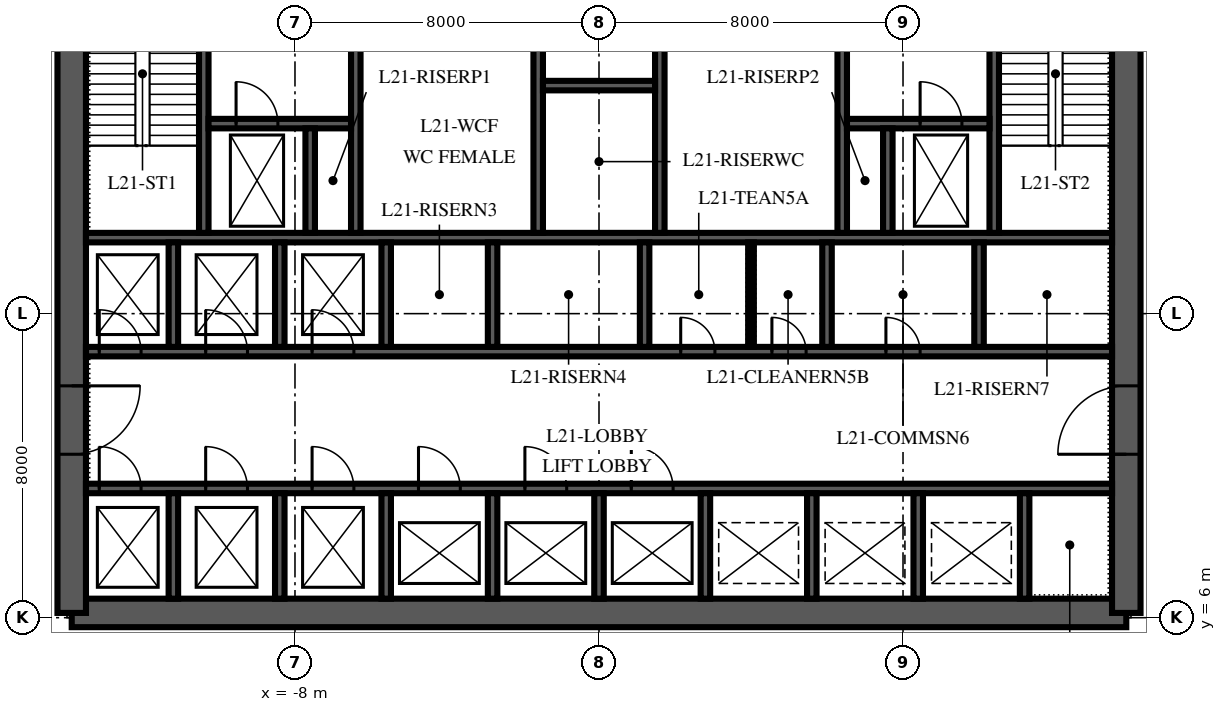
"""IFC4 building model, lengths in metres.
Left out: names, types, materials, properties, quantities, classifications, styles, units other than length and angle.
Written with IfcOpenShell. Run it as: python <this file> out.ifc"""

import sys

from ifc_helpers import new_model, si_unit, direction, frame, frame_2d, origin, place, context, subcontext, project, spatial, polyline, rectangle, outline, extrude, element, fill, save


model = new_model("IFC4")
c1 = context("Model", 3, precision=1e-05, world=origin(), true_north=direction((0.0, 1.0)))
c2 = subcontext(c1, "Body", "Model", "MODEL_VIEW")
j1 = project(units=[si_unit("LENGTHUNIT", "METRE"), si_unit("PLANEANGLEUNIT", "RADIAN")], contexts=[c1])
p1 = place(None, origin())
s1 = spatial("IfcSite", under=j1, at=p1, CompositionType="ELEMENT")
p2 = place(p1, origin())
s2 = spatial("IfcBuilding", under=s1, at=p2, CompositionType="ELEMENT")
p3 = place(p2, frame((0.0, 0.0, 98.0)))
s3 = spatial("IfcBuildingStorey", under=s2, at=p3, CompositionType="ELEMENT", Elevation=98.0)
p4 = place(p3, frame((-13.875, 6.125, 0.0), z_axis=(0.0, 0.0, 1.0), x_axis=(1.0, 0.0, 0.0)))
e1 = element("IfcWall", 1, at=p4, inside=s3, PredefinedType="SHEAR", context=c2, shape_type="SweptSolid", body=[
    extrude(rectangle(XDim=27.75, YDim=0.75, at=frame_2d((13.875, 0.0))), origin(), (0.0, 0.0, 1.0), 5.0),
])
p5 = place(p3, frame((13.875, 6.125, 0.0), z_axis=(0.0, 0.0, 1.0), x_axis=(0.0, 1.0, 0.0)))
e2 = element("IfcWall", 2, at=p5, inside=s3, PredefinedType="SHEAR", context=c2, shape_type="SweptSolid", body=[
    extrude(outline(polyline([(0.0, -0.375), (17.75, -0.375), (17.75, 0.0), (17.375, 0.0), (17.375, 0.375), (0.375, 0.375), (0.375, 0.0), (0.0, 0.0), (0.0, -0.375)])), origin(), (0.0, 0.0, 1.0), 5.0),
])
p6 = place(p5, frame((4.175, 0.0, 0.0)))
e3 = element("IfcOpeningElement", 3, at=p6, cuts=e2, PredefinedType="OPENING", context=c2, shape_type="SweptSolid", body=[
    extrude(rectangle(XDim=1.8, YDim=2.4, at=frame_2d((0.9, 1.2))), frame((0.0, 0.39, 0.0), z_axis=(0.0, -1.0, 0.0), x_axis=(1.0, 0.0, 0.0)), (0.0, 0.0, 1.0), 0.78),
])
p7 = place(p3, frame((-13.875, 23.875, 0.0), z_axis=(0.0, 0.0, 1.0), x_axis=(0.0, -1.0, 0.0)))
e4 = element("IfcWall", 4, at=p7, inside=s3, PredefinedType="SHEAR", context=c2, shape_type="SweptSolid", body=[
    extrude(outline(polyline([(0.0, -0.375), (17.75, -0.375), (17.75, 0.0), (17.375, 0.0), (17.375, 0.375), (0.375, 0.375), (0.375, 0.0), (0.0, 0.0), (0.0, -0.375)])), origin(), (0.0, 0.0, 1.0), 5.0),
])
p8 = place(p7, frame((11.775, 0.0, 0.0)))
e5 = element("IfcOpeningElement", 5, at=p8, cuts=e4, PredefinedType="OPENING", context=c2, shape_type="SweptSolid", body=[
    extrude(rectangle(XDim=1.8, YDim=2.4, at=frame_2d((0.9, 1.2))), frame((0.0, 0.39, 0.0), z_axis=(0.0, -1.0, 0.0), x_axis=(1.0, 0.0, 0.0)), (0.0, 0.0, 1.0), 0.78),
])
p9 = place(p3, frame((-13.5, 9.4, 0.0), z_axis=(0.0, 0.0, 1.0), x_axis=(1.0, 0.0, 0.0)))
e6 = element("IfcWall", 6, at=p9, inside=s3, PredefinedType="SHEAR", context=c2, shape_type="SweptSolid", body=[
    extrude(rectangle(XDim=27.0, YDim=0.25, at=frame_2d((13.5, 0.0))), origin(), (0.0, 0.0, 1.0), 5.0),
])
p10 = place(p9, frame((0.35, 0.0, 0.0)))
e7 = element("IfcOpeningElement", 7, at=p10, cuts=e6, PredefinedType="OPENING", context=c2, shape_type="SweptSolid", body=[
    extrude(rectangle(XDim=1.1, YDim=2.1, at=frame_2d((0.55, 1.05))), frame((0.0, 0.14, 0.0), z_axis=(0.0, -1.0, 0.0), x_axis=(1.0, 0.0, 0.0)), (0.0, 0.0, 1.0), 0.28),
])
p11 = place(p9, frame((3.15, 0.0, 0.0)))
e8 = element("IfcOpeningElement", 8, at=p11, cuts=e6, PredefinedType="OPENING", context=c2, shape_type="SweptSolid", body=[
    extrude(rectangle(XDim=1.1, YDim=2.1, at=frame_2d((0.55, 1.05))), frame((0.0, 0.14, 0.0), z_axis=(0.0, -1.0, 0.0), x_axis=(1.0, 0.0, 0.0)), (0.0, 0.0, 1.0), 0.28),
])
p12 = place(p9, frame((5.95, 0.0, 0.0)))
e9 = element("IfcOpeningElement", 9, at=p12, cuts=e6, PredefinedType="OPENING", context=c2, shape_type="SweptSolid", body=[
    extrude(rectangle(XDim=1.1, YDim=2.1, at=frame_2d((0.55, 1.05))), frame((0.0, 0.14, 0.0), z_axis=(0.0, -1.0, 0.0), x_axis=(1.0, 0.0, 0.0)), (0.0, 0.0, 1.0), 0.28),
])
p13 = place(p9, frame((8.75, 0.0, 0.0)))
e10 = element("IfcOpeningElement", 10, at=p13, cuts=e6, PredefinedType="OPENING", context=c2, shape_type="SweptSolid", body=[
    extrude(rectangle(XDim=1.1, YDim=2.1, at=frame_2d((0.55, 1.05))), frame((0.0, 0.14, 0.0), z_axis=(0.0, -1.0, 0.0), x_axis=(1.0, 0.0, 0.0)), (0.0, 0.0, 1.0), 0.28),
])
p14 = place(p9, frame((11.55, 0.0, 0.0)))
e11 = element("IfcOpeningElement", 11, at=p14, cuts=e6, PredefinedType="OPENING", context=c2, shape_type="SweptSolid", body=[
    extrude(rectangle(XDim=1.1, YDim=2.1, at=frame_2d((0.55, 1.05))), frame((0.0, 0.14, 0.0), z_axis=(0.0, -1.0, 0.0), x_axis=(1.0, 0.0, 0.0)), (0.0, 0.0, 1.0), 0.28),
])
p15 = place(p9, frame((14.35, 0.0, 0.0)))
e12 = element("IfcOpeningElement", 12, at=p15, cuts=e6, PredefinedType="OPENING", context=c2, shape_type="SweptSolid", body=[
    extrude(rectangle(XDim=1.1, YDim=2.1, at=frame_2d((0.55, 1.05))), frame((0.0, 0.14, 0.0), z_axis=(0.0, -1.0, 0.0), x_axis=(1.0, 0.0, 0.0)), (0.0, 0.0, 1.0), 0.28),
])
p16 = place(p3, frame((-13.5, 13.0, 0.0), z_axis=(0.0, 0.0, 1.0), x_axis=(1.0, 0.0, 0.0)))
e13 = element("IfcWall", 13, at=p16, inside=s3, PredefinedType="SHEAR", context=c2, shape_type="SweptSolid", body=[
    extrude(rectangle(XDim=27.0, YDim=0.25, at=frame_2d((13.5, 0.0))), origin(), (0.0, 0.0, 1.0), 5.0),
])
p17 = place(p16, frame((0.35, 0.0, 0.0)))
e14 = element("IfcOpeningElement", 14, at=p17, cuts=e13, PredefinedType="OPENING", context=c2, shape_type="SweptSolid", body=[
    extrude(rectangle(XDim=1.1, YDim=2.1, at=frame_2d((0.55, 1.05))), frame((0.0, 0.14, 0.0), z_axis=(0.0, -1.0, 0.0), x_axis=(1.0, 0.0, 0.0)), (0.0, 0.0, 1.0), 0.28),
])
p18 = place(p16, frame((3.15, 0.0, 0.0)))
e15 = element("IfcOpeningElement", 15, at=p18, cuts=e13, PredefinedType="OPENING", context=c2, shape_type="SweptSolid", body=[
    extrude(rectangle(XDim=1.1, YDim=2.1, at=frame_2d((0.55, 1.05))), frame((0.0, 0.14, 0.0), z_axis=(0.0, -1.0, 0.0), x_axis=(1.0, 0.0, 0.0)), (0.0, 0.0, 1.0), 0.28),
])
p19 = place(p16, frame((5.95, 0.0, 0.0)))
e16 = element("IfcOpeningElement", 16, at=p19, cuts=e13, PredefinedType="OPENING", context=c2, shape_type="SweptSolid", body=[
    extrude(rectangle(XDim=1.1, YDim=2.1, at=frame_2d((0.55, 1.05))), frame((0.0, 0.14, 0.0), z_axis=(0.0, -1.0, 0.0), x_axis=(1.0, 0.0, 0.0)), (0.0, 0.0, 1.0), 0.28),
])
p20 = place(p16, frame((15.65, 0.0, 0.0)))
e17 = element("IfcOpeningElement", 17, at=p20, cuts=e13, PredefinedType="OPENING", context=c2, shape_type="SweptSolid", body=[
    extrude(rectangle(XDim=0.9, YDim=2.1, at=frame_2d((0.45, 1.05))), frame((0.0, 0.14, 0.0), z_axis=(0.0, -1.0, 0.0), x_axis=(1.0, 0.0, 0.0)), (0.0, 0.0, 1.0), 0.28),
])
p21 = place(p16, frame((18.05, 0.0, 0.0)))
e18 = element("IfcOpeningElement", 18, at=p21, cuts=e13, PredefinedType="OPENING", context=c2, shape_type="SweptSolid", body=[
    extrude(rectangle(XDim=0.9, YDim=2.1, at=frame_2d((0.45, 1.05))), frame((0.0, 0.14, 0.0), z_axis=(0.0, -1.0, 0.0), x_axis=(1.0, 0.0, 0.0)), (0.0, 0.0, 1.0), 0.28),
])
p22 = place(p16, frame((21.05, 0.0, 0.0)))
e19 = element("IfcOpeningElement", 19, at=p22, cuts=e13, PredefinedType="OPENING", context=c2, shape_type="SweptSolid", body=[
    extrude(rectangle(XDim=0.9, YDim=2.1, at=frame_2d((0.45, 1.05))), frame((0.0, 0.14, 0.0), z_axis=(0.0, -1.0, 0.0), x_axis=(1.0, 0.0, 0.0)), (0.0, 0.0, 1.0), 0.28),
])
p23 = place(p3, frame((-13.5, 16.0, 0.0), z_axis=(0.0, 0.0, 1.0), x_axis=(1.0, 0.0, 0.0)))
e20 = element("IfcWall", 20, at=p23, inside=s3, PredefinedType="SHEAR", context=c2, shape_type="SweptSolid", body=[
    extrude(rectangle(XDim=27.0, YDim=0.25, at=frame_2d((13.5, 0.0))), origin(), (0.0, 0.0, 1.0), 5.0),
])
for number, where, z_axis, x_axis in (
    (21, (-11.2, 6.5, 0.0), (0.0, 0.0, 1.0), (0.0, 1.0, 0.0)),
    (22, (-8.4, 6.5, 0.0), (0.0, 0.0, 1.0), (0.0, 1.0, 0.0)),
    (23, (-5.6, 6.5, 0.0), (0.0, 0.0, 1.0), (0.0, 1.0, 0.0)),
    (24, (-2.8, 6.5, 0.0), (0.0, 0.0, 1.0), (0.0, 1.0, 0.0)),
    (25, (0.0, 6.5, 0.0), (0.0, 0.0, 1.0), (0.0, 1.0, 0.0)),
    (26, (2.8, 6.5, 0.0), (0.0, 0.0, 1.0), (0.0, 1.0, 0.0)),
    (27, (5.6, 6.5, 0.0), (0.0, 0.0, 1.0), (0.0, 1.0, 0.0)),
    (28, (8.4, 6.5, 0.0), (0.0, 0.0, 1.0), (0.0, 1.0, 0.0)),
    (29, (11.2, 6.5, 0.0), (0.0, 0.0, 1.0), (0.0, 1.0, 0.0)),
):
    element("IfcWall", number, at=place(p3, frame(where, z_axis=z_axis, x_axis=x_axis)), inside=s3, PredefinedType="SHEAR", context=c2, shape_type="SweptSolid", body=[
        extrude(rectangle(XDim=2.775, YDim=0.25, at=frame_2d((1.387, 0.0))), origin(), (0.0, 0.0, 1.0), 5.0),
    ])
for number, where, z_axis, x_axis in (
    (30, (-11.2, 13.125, 0.0), (0.0, 0.0, 1.0), (0.0, 1.0, 0.0)),
    (31, (-8.4, 13.125, 0.0), (0.0, 0.0, 1.0), (0.0, 1.0, 0.0)),
    (32, (-5.6, 13.125, 0.0), (0.0, 0.0, 1.0), (0.0, 1.0, 0.0)),
    (33, (-2.8, 13.125, 0.0), (0.0, 0.0, 1.0), (0.0, 1.0, 0.0)),
    (34, (1.2, 13.125, 0.0), (0.0, 0.0, 1.0), (0.0, 1.0, 0.0)),
    (35, (6.0, 13.125, 0.0), (0.0, 0.0, 1.0), (0.0, 1.0, 0.0)),
    (36, (10.0, 13.125, 0.0), (0.0, 0.0, 1.0), (0.0, 1.0, 0.0)),
):
    element("IfcWall", number, at=place(p3, frame(where, z_axis=z_axis, x_axis=x_axis)), inside=s3, PredefinedType="SHEAR", context=c2, shape_type="SweptSolid", body=[
        extrude(rectangle(XDim=2.75, YDim=0.25, at=frame_2d((1.375, 0.0))), origin(), (0.0, 0.0, 1.0), 5.0),
    ])
p24 = place(p3, frame((-10.4, 16.125, 0.0), z_axis=(0.0, 0.0, 1.0), x_axis=(0.0, 1.0, 0.0)))
e37 = element("IfcWall", 37, at=p24, inside=s3, PredefinedType="SHEAR", context=c2, shape_type="SweptSolid", body=[
    extrude(rectangle(XDim=7.375, YDim=0.25, at=frame_2d((3.688, 0.0))), origin(), (0.0, 0.0, 1.0), 5.0),
])
p25 = place(p24, frame((6.175, 0.0, 0.0)))
e38 = element("IfcOpeningElement", 38, at=p25, cuts=e37, PredefinedType="OPENING", context=c2, shape_type="SweptSolid", body=[
    extrude(rectangle(XDim=1.0, YDim=2.1, at=frame_2d((0.5, 1.05))), frame((0.0, 0.14, 0.0), z_axis=(0.0, -1.0, 0.0), x_axis=(1.0, 0.0, 0.0)), (0.0, 0.0, 1.0), 0.28),
])
for number, where, z_axis, x_axis in (
    (39, (-6.4, 16.125, 0.0), (0.0, 0.0, 1.0), (0.0, 1.0, 0.0)),
    (40, (-1.6, 16.125, 0.0), (0.0, 0.0, 1.0), (0.0, 1.0, 0.0)),
    (41, (1.6, 16.125, 0.0), (0.0, 0.0, 1.0), (0.0, 1.0, 0.0)),
    (42, (6.4, 16.125, 0.0), (0.0, 0.0, 1.0), (0.0, 1.0, 0.0)),
):
    element("IfcWall", number, at=place(p3, frame(where, z_axis=z_axis, x_axis=x_axis)), inside=s3, PredefinedType="SHEAR", context=c2, shape_type="SweptSolid", body=[
        extrude(rectangle(XDim=7.375, YDim=0.25, at=frame_2d((3.688, 0.0))), origin(), (0.0, 0.0, 1.0), 5.0),
    ])
p26 = place(p3, frame((10.4, 16.125, 0.0), z_axis=(0.0, 0.0, 1.0), x_axis=(0.0, 1.0, 0.0)))
e43 = element("IfcWall", 43, at=p26, inside=s3, PredefinedType="SHEAR", context=c2, shape_type="SweptSolid", body=[
    extrude(rectangle(XDim=7.375, YDim=0.25, at=frame_2d((3.688, 0.0))), origin(), (0.0, 0.0, 1.0), 5.0),
])
p27 = place(p26, frame((6.175, 0.0, 0.0)))
e44 = element("IfcOpeningElement", 44, at=p27, cuts=e43, PredefinedType="OPENING", context=c2, shape_type="SweptSolid", body=[
    extrude(rectangle(XDim=1.0, YDim=2.1, at=frame_2d((0.5, 1.05))), frame((0.0, 0.14, 0.0), z_axis=(0.0, -1.0, 0.0), x_axis=(1.0, 0.0, 0.0)), (0.0, 0.0, 1.0), 0.28),
])
p28 = place(p3, frame((-10.275, 19.0, 0.0), z_axis=(0.0, 0.0, 1.0), x_axis=(1.0, 0.0, 0.0)))
e45 = element("IfcWall", 45, at=p28, inside=s3, PredefinedType="SHEAR", context=c2, shape_type="SweptSolid", body=[
    extrude(rectangle(XDim=3.75, YDim=0.25, at=frame_2d((1.875, 0.0))), origin(), (0.0, 0.0, 1.0), 5.0),
])
p29 = place(p28, frame((0.725, 0.0, 0.0)))
e46 = element("IfcOpeningElement", 46, at=p29, cuts=e45, PredefinedType="OPENING", context=c2, shape_type="SweptSolid", body=[
    extrude(rectangle(XDim=1.1, YDim=2.1, at=frame_2d((0.55, 1.05))), frame((0.0, 0.14, 0.0), z_axis=(0.0, -1.0, 0.0), x_axis=(1.0, 0.0, 0.0)), (0.0, 0.0, 1.0), 0.28),
])
p30 = place(p3, frame((6.525, 19.0, 0.0), z_axis=(0.0, 0.0, 1.0), x_axis=(1.0, 0.0, 0.0)))
e47 = element("IfcWall", 47, at=p30, inside=s3, PredefinedType="SHEAR", context=c2, shape_type="SweptSolid", body=[
    extrude(rectangle(XDim=3.75, YDim=0.25, at=frame_2d((1.875, 0.0))), origin(), (0.0, 0.0, 1.0), 5.0),
])
p31 = place(p30, frame((1.925, 0.0, 0.0)))
e48 = element("IfcOpeningElement", 48, at=p31, cuts=e47, PredefinedType="OPENING", context=c2, shape_type="SweptSolid", body=[
    extrude(rectangle(XDim=1.1, YDim=2.1, at=frame_2d((0.55, 1.05))), frame((0.0, 0.14, 0.0), z_axis=(0.0, -1.0, 0.0), x_axis=(1.0, 0.0, 0.0)), (0.0, 0.0, 1.0), 0.28),
])
for number, where, z_axis, x_axis in (
    (49, (-7.6, 16.125, 0.0), (0.0, 0.0, 1.0), (0.0, 1.0, 0.0)),
    (50, (7.6, 16.125, 0.0), (0.0, 0.0, 1.0), (0.0, 1.0, 0.0)),
):
    element("IfcWall", number, at=place(p3, frame(where, z_axis=z_axis, x_axis=x_axis)), inside=s3, PredefinedType="SHEAR", context=c2, shape_type="SweptSolid", body=[
        extrude(rectangle(XDim=2.75, YDim=0.25, at=frame_2d((1.375, 0.0))), origin(), (0.0, 0.0, 1.0), 5.0),
    ])
p32 = place(p3, frame((-1.475, 20.0, 0.0), z_axis=(0.0, 0.0, 1.0), x_axis=(1.0, 0.0, 0.0)))
e51 = element("IfcWall", 51, at=p32, inside=s3, PredefinedType="SHEAR", context=c2, shape_type="SweptSolid", body=[
    extrude(rectangle(XDim=2.95, YDim=0.25, at=frame_2d((1.475, 0.0))), origin(), (0.0, 0.0, 1.0), 5.0),
])
p33 = place(p3, frame((4.0, 13.125, 0.0), z_axis=(0.0, 0.0, 1.0), x_axis=(0.0, 1.0, 0.0)))
e52 = element("IfcWall", 52, at=p33, inside=s3, PredefinedType="PARTITIONING", context=c2, shape_type="SweptSolid", body=[
    extrude(rectangle(XDim=2.75, YDim=0.15, at=frame_2d((1.375, 0.0))), origin(), (0.0, 0.0, 1.0), 4.85),
])
p34 = place(p6, origin())
e53 = element("IfcDoor", 53, at=p34, inside=s3, OperationType="DOUBLE_DOOR_SINGLE_SWING", PredefinedType="DOOR", context=c2, shape_type="SweptSolid", body=[
    extrude(rectangle(XDim=1.8, YDim=2.4, at=frame_2d((0.9, 1.2))), frame((0.0, 0.375, 0.0), z_axis=(0.0, -1.0, 0.0), x_axis=(1.0, 0.0, 0.0)), (0.0, 0.0, 1.0), 0.75),
])
fill(e3, e53)
p35 = place(p8, origin())
e54 = element("IfcDoor", 54, at=p35, inside=s3, OperationType="DOUBLE_DOOR_SINGLE_SWING", PredefinedType="DOOR", context=c2, shape_type="SweptSolid", body=[
    extrude(rectangle(XDim=1.8, YDim=2.4, at=frame_2d((0.9, 1.2))), frame((0.0, 0.375, 0.0), z_axis=(0.0, -1.0, 0.0), x_axis=(1.0, 0.0, 0.0)), (0.0, 0.0, 1.0), 0.75),
])
fill(e5, e54)
p36 = place(p10, origin())
e55 = element("IfcDoor", 55, at=p36, inside=s3, OperationType="SLIDING_TO_LEFT", PredefinedType="DOOR", context=c2, shape_type="SweptSolid", body=[
    extrude(rectangle(XDim=1.1, YDim=2.1, at=frame_2d((0.55, 1.05))), frame((0.0, 0.125, 0.0), z_axis=(0.0, -1.0, 0.0), x_axis=(1.0, 0.0, 0.0)), (0.0, 0.0, 1.0), 0.25),
])
fill(e7, e55)
p37 = place(p11, origin())
e56 = element("IfcDoor", 56, at=p37, inside=s3, OperationType="SLIDING_TO_LEFT", PredefinedType="DOOR", context=c2, shape_type="SweptSolid", body=[
    extrude(rectangle(XDim=1.1, YDim=2.1, at=frame_2d((0.55, 1.05))), frame((0.0, 0.125, 0.0), z_axis=(0.0, -1.0, 0.0), x_axis=(1.0, 0.0, 0.0)), (0.0, 0.0, 1.0), 0.25),
])
fill(e8, e56)
p38 = place(p12, origin())
e57 = element("IfcDoor", 57, at=p38, inside=s3, OperationType="SLIDING_TO_LEFT", PredefinedType="DOOR", context=c2, shape_type="SweptSolid", body=[
    extrude(rectangle(XDim=1.1, YDim=2.1, at=frame_2d((0.55, 1.05))), frame((0.0, 0.125, 0.0), z_axis=(0.0, -1.0, 0.0), x_axis=(1.0, 0.0, 0.0)), (0.0, 0.0, 1.0), 0.25),
])
fill(e9, e57)
p39 = place(p17, origin())
e58 = element("IfcDoor", 58, at=p39, inside=s3, OperationType="SLIDING_TO_LEFT", PredefinedType="DOOR", context=c2, shape_type="SweptSolid", body=[
    extrude(rectangle(XDim=1.1, YDim=2.1, at=frame_2d((0.55, 1.05))), frame((0.0, 0.125, 0.0), z_axis=(0.0, -1.0, 0.0), x_axis=(1.0, 0.0, 0.0)), (0.0, 0.0, 1.0), 0.25),
])
fill(e14, e58)
p40 = place(p18, origin())
e59 = element("IfcDoor", 59, at=p40, inside=s3, OperationType="SLIDING_TO_LEFT", PredefinedType="DOOR", context=c2, shape_type="SweptSolid", body=[
    extrude(rectangle(XDim=1.1, YDim=2.1, at=frame_2d((0.55, 1.05))), frame((0.0, 0.125, 0.0), z_axis=(0.0, -1.0, 0.0), x_axis=(1.0, 0.0, 0.0)), (0.0, 0.0, 1.0), 0.25),
])
fill(e15, e59)
p41 = place(p19, origin())
e60 = element("IfcDoor", 60, at=p41, inside=s3, OperationType="SLIDING_TO_LEFT", PredefinedType="DOOR", context=c2, shape_type="SweptSolid", body=[
    extrude(rectangle(XDim=1.1, YDim=2.1, at=frame_2d((0.55, 1.05))), frame((0.0, 0.125, 0.0), z_axis=(0.0, -1.0, 0.0), x_axis=(1.0, 0.0, 0.0)), (0.0, 0.0, 1.0), 0.25),
])
fill(e16, e60)
p42 = place(p13, origin())
e61 = element("IfcDoor", 61, at=p42, inside=s3, OperationType="SLIDING_TO_LEFT", PredefinedType="DOOR", context=c2, shape_type="SweptSolid", body=[
    extrude(rectangle(XDim=1.1, YDim=2.1, at=frame_2d((0.55, 1.05))), frame((0.0, 0.125, 0.0), z_axis=(0.0, -1.0, 0.0), x_axis=(1.0, 0.0, 0.0)), (0.0, 0.0, 1.0), 0.25),
])
fill(e10, e61)
p43 = place(p14, origin())
e62 = element("IfcDoor", 62, at=p43, inside=s3, OperationType="SLIDING_TO_LEFT", PredefinedType="DOOR", context=c2, shape_type="SweptSolid", body=[
    extrude(rectangle(XDim=1.1, YDim=2.1, at=frame_2d((0.55, 1.05))), frame((0.0, 0.125, 0.0), z_axis=(0.0, -1.0, 0.0), x_axis=(1.0, 0.0, 0.0)), (0.0, 0.0, 1.0), 0.25),
])
fill(e11, e62)
p44 = place(p15, origin())
e63 = element("IfcDoor", 63, at=p44, inside=s3, OperationType="SLIDING_TO_LEFT", PredefinedType="DOOR", context=c2, shape_type="SweptSolid", body=[
    extrude(rectangle(XDim=1.1, YDim=2.1, at=frame_2d((0.55, 1.05))), frame((0.0, 0.125, 0.0), z_axis=(0.0, -1.0, 0.0), x_axis=(1.0, 0.0, 0.0)), (0.0, 0.0, 1.0), 0.25),
])
fill(e12, e63)
p45 = place(p31, origin())
e64 = element("IfcDoor", 64, at=p45, inside=s3, OperationType="SLIDING_TO_RIGHT", PredefinedType="DOOR", context=c2, shape_type="SweptSolid", body=[
    extrude(rectangle(XDim=1.1, YDim=2.1, at=frame_2d((0.55, 1.05))), frame((0.0, 0.125, 0.0), z_axis=(0.0, -1.0, 0.0), x_axis=(1.0, 0.0, 0.0)), (0.0, 0.0, 1.0), 0.25),
])
fill(e48, e64)
p46 = place(p29, origin())
e65 = element("IfcDoor", 65, at=p46, inside=s3, OperationType="SLIDING_TO_RIGHT", PredefinedType="DOOR", context=c2, shape_type="SweptSolid", body=[
    extrude(rectangle(XDim=1.1, YDim=2.1, at=frame_2d((0.55, 1.05))), frame((0.0, 0.125, 0.0), z_axis=(0.0, -1.0, 0.0), x_axis=(1.0, 0.0, 0.0)), (0.0, 0.0, 1.0), 0.25),
])
fill(e46, e65)
p47 = place(p20, origin())
e66 = element("IfcDoor", 66, at=p47, inside=s3, OperationType="SINGLE_SWING_LEFT", PredefinedType="DOOR", context=c2, shape_type="SweptSolid", body=[
    extrude(rectangle(XDim=0.9, YDim=2.1, at=frame_2d((0.45, 1.05))), frame((0.0, 0.125, 0.0), z_axis=(0.0, -1.0, 0.0), x_axis=(1.0, 0.0, 0.0)), (0.0, 0.0, 1.0), 0.25),
])
fill(e17, e66)
p48 = place(p21, origin())
e67 = element("IfcDoor", 67, at=p48, inside=s3, OperationType="SINGLE_SWING_LEFT", PredefinedType="DOOR", context=c2, shape_type="SweptSolid", body=[
    extrude(rectangle(XDim=0.9, YDim=2.1, at=frame_2d((0.45, 1.05))), frame((0.0, 0.125, 0.0), z_axis=(0.0, -1.0, 0.0), x_axis=(1.0, 0.0, 0.0)), (0.0, 0.0, 1.0), 0.25),
])
fill(e18, e67)
p49 = place(p22, origin())
e68 = element("IfcDoor", 68, at=p49, inside=s3, OperationType="SINGLE_SWING_LEFT", PredefinedType="DOOR", context=c2, shape_type="SweptSolid", body=[
    extrude(rectangle(XDim=0.9, YDim=2.1, at=frame_2d((0.45, 1.05))), frame((0.0, 0.125, 0.0), z_axis=(0.0, -1.0, 0.0), x_axis=(1.0, 0.0, 0.0)), (0.0, 0.0, 1.0), 0.25),
])
fill(e19, e68)
save(model, sys.argv[1])
